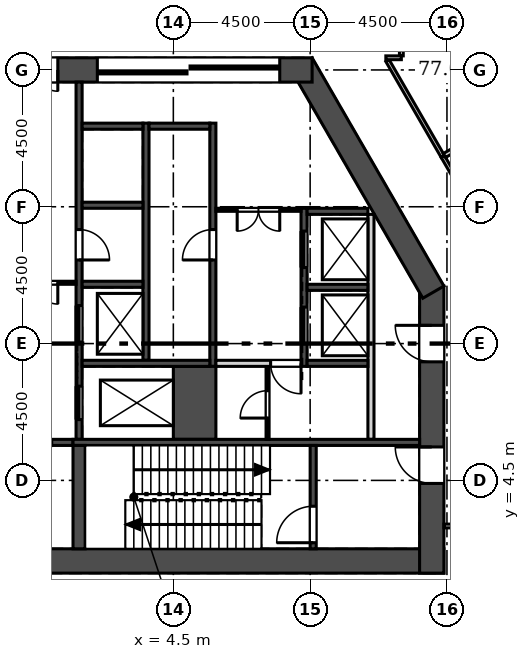
"""IFC4 building model, lengths in metres.
Left out: names, types, materials, properties, quantities, classifications, styles, units other than length and angle.
Written with IfcOpenShell. Run it as: python <this file> out.ifc"""

import sys

from ifc_helpers import new_model, si_unit, direction, frame, frame_2d, origin, place, context, subcontext, project, spatial, rectangle, extrude, element, fill, save


model = new_model("IFC4")
c1 = context("Model", 3, precision=1e-05, world=origin(), true_north=direction((0.0, 1.0)))
c2 = subcontext(c1, "Body", "Model", "MODEL_VIEW")
j1 = project(units=[si_unit("LENGTHUNIT", "METRE"), si_unit("PLANEANGLEUNIT", "RADIAN")], contexts=[c1])
p1 = place(None, origin())
s1 = spatial("IfcSite", under=j1, at=p1, CompositionType="ELEMENT")
p2 = place(p1, origin())
s2 = spatial("IfcBuilding", under=s1, at=p2, CompositionType="ELEMENT")
p3 = place(p2, frame((0.0, 0.0, 339.3)))
s3 = spatial("IfcBuildingStorey", under=s2, at=p3, CompositionType="ELEMENT", Elevation=339.3)
p4 = place(p3, frame((-13.4, 1.85, 0.0), z_axis=(0.0, 0.0, 1.0), x_axis=(1.0, 0.0, 0.0)))
e1 = element("IfcWall", 1, at=p4, inside=s3, PredefinedType="SHEAR", context=c2, shape_type="SweptSolid", body=[
    extrude(rectangle(XDim=26.8, YDim=0.8, at=frame_2d((13.4, 0.0))), origin(), (0.0, 0.0, 1.0), 5.4),
])
p5 = place(p3, frame((13.0, 1.45, 0.0), z_axis=(0.0, 0.0, 1.0), x_axis=(0.0, 1.0, 0.0)))
e2 = element("IfcWall", 2, at=p5, inside=s3, PredefinedType="SHEAR", context=c2, shape_type="SweptSolid", body=[
    extrude(rectangle(XDim=9.442, YDim=0.8, at=frame_2d((4.721, 0.0))), origin(), (0.0, 0.0, 1.0), 5.4),
])
p6 = place(p5, frame((2.95, 0.0, 0.0)))
e3 = element("IfcOpeningElement", 3, at=p6, cuts=e2, PredefinedType="OPENING", context=c2, shape_type="SweptSolid", body=[
    extrude(rectangle(XDim=1.2, YDim=2.1, at=frame_2d((0.6, 1.05))), frame((0.0, 0.41, 0.0), z_axis=(0.0, -1.0, 0.0), x_axis=(1.0, 0.0, 0.0)), (0.0, 0.0, 1.0), 0.82),
])
p7 = place(p5, frame((6.95, 0.0, 0.0)))
e4 = element("IfcOpeningElement", 4, at=p7, cuts=e2, PredefinedType="OPENING", context=c2, shape_type="SweptSolid", body=[
    extrude(rectangle(XDim=1.2, YDim=2.1, at=frame_2d((0.6, 1.05))), frame((0.0, 0.41, 0.0), z_axis=(0.0, -1.0, 0.0), x_axis=(1.0, 0.0, 0.0)), (0.0, 0.0, 1.0), 0.82),
])
p8 = place(p3, frame((13.054, 10.692, 0.0), z_axis=(0.0, 0.0, 1.0), x_axis=(-0.500015780397, 0.866016292776, 0.0)))
e5 = element("IfcWall", 5, at=p8, inside=s3, PredefinedType="SHEAR", context=c2, shape_type="SweptSolid", body=[
    extrude(rectangle(XDim=8.67, YDim=0.8, at=frame_2d((4.335, 0.0))), origin(), (0.0, 0.0, 1.0), 5.4),
])
p9 = place(p3, frame((9.065, 18.0, 0.0), z_axis=(0.0, 0.0, 1.0), x_axis=(-1.0, 0.0, 0.0)))
e6 = element("IfcWall", 6, at=p9, inside=s3, PredefinedType="SHEAR", context=c2, shape_type="SweptSolid", body=[
    extrude(rectangle(XDim=18.13, YDim=0.8, at=frame_2d((9.065, 0.0))), origin(), (0.0, 0.0, 1.0), 5.4),
])
p10 = place(p9, frame((8.365, 0.0, 0.0)))
e7 = element("IfcOpeningElement", 7, at=p10, cuts=e6, PredefinedType="OPENING", context=c2, shape_type="SweptSolid", body=[
    extrude(rectangle(XDim=1.4, YDim=2.1, at=frame_2d((0.7, 1.05))), frame((0.0, 0.41, 0.0), z_axis=(0.0, -1.0, 0.0), x_axis=(1.0, 0.0, 0.0)), (0.0, 0.0, 1.0), 0.82),
])
p11 = place(p9, frame((11.065, 0.0, 0.0)))
e8 = element("IfcOpeningElement", 8, at=p11, cuts=e6, PredefinedType="OPENING", context=c2, shape_type="SweptSolid", body=[
    extrude(rectangle(XDim=6.0, YDim=2.4, at=frame_2d((3.0, 1.2))), frame((0.0, 0.41, 0.0), z_axis=(0.0, -1.0, 0.0), x_axis=(1.0, 0.0, 0.0)), (0.0, 0.0, 1.0), 0.82),
])
p12 = place(p9, frame((1.065, 0.0, 0.0)))
e9 = element("IfcOpeningElement", 9, at=p12, cuts=e6, PredefinedType="OPENING", context=c2, shape_type="SweptSolid", body=[
    extrude(rectangle(XDim=6.0, YDim=2.4, at=frame_2d((3.0, 1.2))), frame((0.0, 0.41, 0.0), z_axis=(0.0, -1.0, 0.0), x_axis=(1.0, 0.0, 0.0)), (0.0, 0.0, 1.0), 0.82),
])
p13 = place(p3, frame((11.0, 5.85, 0.0), z_axis=(0.0, 0.0, 1.0), x_axis=(0.0, 1.0, 0.0)))
e10 = element("IfcWall", 10, at=p13, inside=s3, PredefinedType="SOLIDWALL", context=c2, shape_type="SweptSolid", body=[
    extrude(rectangle(XDim=7.4, YDim=0.2, at=frame_2d((3.7, 0.0))), origin(), (0.0, 0.0, 1.0), 4.6),
])
p14 = place(p3, frame((8.8, 8.25, -0.4), z_axis=(0.0, 0.0, 1.0), x_axis=(0.0, 1.0, 0.0)))
e11 = element("IfcWall", 11, at=p14, inside=s3, PredefinedType="SOLIDWALL", context=c2, shape_type="SweptSolid", body=[
    extrude(rectangle(XDim=5.2, YDim=0.2, at=frame_2d((2.6, 0.0))), origin(), (0.0, 0.0, 1.0), 5.0),
])
p15 = place(p14, frame((0.75, 0.0, 0.4)))
e12 = element("IfcOpeningElement", 12, at=p15, cuts=e11, PredefinedType="OPENING", context=c2, shape_type="SweptSolid", body=[
    extrude(rectangle(XDim=1.2, YDim=2.1, at=frame_2d((0.6, 1.05))), frame((0.0, 0.11, 0.0), z_axis=(0.0, -1.0, 0.0), x_axis=(1.0, 0.0, 0.0)), (0.0, 0.0, 1.0), 0.22),
])
p16 = place(p14, frame((3.25, 0.0, 0.4)))
e13 = element("IfcOpeningElement", 13, at=p16, cuts=e11, PredefinedType="OPENING", context=c2, shape_type="SweptSolid", body=[
    extrude(rectangle(XDim=1.2, YDim=2.1, at=frame_2d((0.6, 1.05))), frame((0.0, 0.11, 0.0), z_axis=(0.0, -1.0, 0.0), x_axis=(1.0, 0.0, 0.0)), (0.0, 0.0, 1.0), 0.22),
])
p17 = place(p3, frame((5.8, 8.25, -0.4), z_axis=(0.0, 0.0, 1.0), x_axis=(0.0, 1.0, 0.0)))
e14 = element("IfcWall", 14, at=p17, inside=s3, PredefinedType="SOLIDWALL", context=c2, shape_type="SweptSolid", body=[
    extrude(rectangle(XDim=8.0, YDim=0.2, at=frame_2d((4.0, 0.0))), origin(), (0.0, 0.0, 1.0), 5.0),
])
p18 = place(p17, frame((3.5, 0.0, 0.4)))
e15 = element("IfcOpeningElement", 15, at=p18, cuts=e14, PredefinedType="OPENING", context=c2, shape_type="SweptSolid", body=[
    extrude(rectangle(XDim=1.0, YDim=2.1, at=frame_2d((0.5, 1.05))), frame((0.0, 0.11, 0.0), z_axis=(0.0, -1.0, 0.0), x_axis=(1.0, 0.0, 0.0)), (0.0, 0.0, 1.0), 0.22),
])
p19 = place(p3, frame((3.6, 8.45, -0.4), z_axis=(0.0, 0.0, 1.0), x_axis=(0.0, 1.0, 0.0)))
e16 = element("IfcWall", 16, at=p19, inside=s3, PredefinedType="SOLIDWALL", context=c2, shape_type="SweptSolid", body=[
    extrude(rectangle(XDim=7.8, YDim=0.2, at=frame_2d((3.9, 0.0))), origin(), (0.0, 0.0, 1.0), 5.0),
])
p20 = place(p3, frame((1.4, 5.85, -0.4), z_axis=(0.0, 0.0, 1.0), x_axis=(0.0, 1.0, 0.0)))
e17 = element("IfcWall", 17, at=p20, inside=s3, PredefinedType="SOLIDWALL", context=c2, shape_type="SweptSolid", body=[
    extrude(rectangle(XDim=11.75, YDim=0.2, at=frame_2d((5.875, 0.0))), origin(), (0.0, 0.0, 1.0), 5.0),
])
p21 = place(p20, frame((3.2, 0.0, 0.4)))
e18 = element("IfcOpeningElement", 18, at=p21, cuts=e17, PredefinedType="OPENING", context=c2, shape_type="SweptSolid", body=[
    extrude(rectangle(XDim=1.2, YDim=2.1, at=frame_2d((0.6, 1.05))), frame((0.0, 0.11, 0.0), z_axis=(0.0, -1.0, 0.0), x_axis=(1.0, 0.0, 0.0)), (0.0, 0.0, 1.0), 0.22),
])
p22 = place(p20, frame((0.65, 0.0, 0.4)))
e19 = element("IfcOpeningElement", 19, at=p22, cuts=e17, PredefinedType="OPENING", context=c2, shape_type="SweptSolid", body=[
    extrude(rectangle(XDim=1.1, YDim=2.1, at=frame_2d((0.55, 1.05))), frame((0.0, 0.11, 0.0), z_axis=(0.0, -1.0, 0.0), x_axis=(1.0, 0.0, 0.0)), (0.0, 0.0, 1.0), 0.22),
])
p23 = place(p20, frame((5.9, 0.0, 0.4)))
e20 = element("IfcOpeningElement", 20, at=p23, cuts=e17, PredefinedType="OPENING", context=c2, shape_type="SweptSolid", body=[
    extrude(rectangle(XDim=1.0, YDim=2.1, at=frame_2d((0.5, 1.05))), frame((0.0, 0.11, 0.0), z_axis=(0.0, -1.0, 0.0), x_axis=(1.0, 0.0, 0.0)), (0.0, 0.0, 1.0), 0.22),
])
p24 = place(p3, frame((5.2, 5.85, -0.4), z_axis=(0.0, 0.0, 1.0), x_axis=(0.0, 1.0, 0.0)))
e21 = element("IfcWall", 21, at=p24, inside=s3, PredefinedType="SOLIDWALL", context=c2, shape_type="SweptSolid", body=[
    extrude(rectangle(XDim=2.4, YDim=1.4, at=frame_2d((1.2, 0.0))), origin(), (0.0, 0.0, 1.0), 5.0),
])
p25 = place(p3, frame((8.9, 8.35, -0.4), z_axis=(0.0, 0.0, 1.0), x_axis=(1.0, 0.0, 0.0)))
e22 = element("IfcWall", 22, at=p25, inside=s3, PredefinedType="SOLIDWALL", context=c2, shape_type="SweptSolid", body=[
    extrude(rectangle(XDim=2.0, YDim=0.2, at=frame_2d((1.0, 0.0))), origin(), (0.0, 0.0, 1.0), 5.0),
])
p26 = place(p3, frame((1.5, 8.35, -0.4), z_axis=(0.0, 0.0, 1.0), x_axis=(1.0, 0.0, 0.0)))
e23 = element("IfcWall", 23, at=p26, inside=s3, PredefinedType="SOLIDWALL", context=c2, shape_type="SweptSolid", body=[
    extrude(rectangle(XDim=4.2, YDim=0.2, at=frame_2d((2.1, 0.0))), origin(), (0.0, 0.0, 1.0), 5.0),
])
p27 = place(p3, frame((-1.2, 5.75, -0.4), z_axis=(0.0, 0.0, 1.0), x_axis=(1.0, 0.0, 0.0)))
e24 = element("IfcWall", 24, at=p27, inside=s3, PredefinedType="SOLIDWALL", context=c2, shape_type="SweptSolid", body=[
    extrude(rectangle(XDim=2.4, YDim=0.2, at=frame_2d((1.2, 0.0))), origin(), (0.0, 0.0, 1.0), 5.0),
])
p28 = place(p27, frame((0.7, 0.0, 0.4)))
e25 = element("IfcOpeningElement", 25, at=p28, cuts=e24, PredefinedType="OPENING", context=c2, shape_type="SweptSolid", body=[
    extrude(rectangle(XDim=1.0, YDim=2.1, at=frame_2d((0.5, 1.05))), frame((0.0, 0.11, 0.0), z_axis=(0.0, -1.0, 0.0), x_axis=(1.0, 0.0, 0.0)), (0.0, 0.0, 1.0), 0.22),
])
p29 = place(p3, frame((1.2, 5.75, -0.4), z_axis=(0.0, 0.0, 1.0), x_axis=(1.0, 0.0, 0.0)))
e26 = element("IfcWall", 26, at=p29, inside=s3, PredefinedType="SOLIDWALL", context=c2, shape_type="SweptSolid", body=[
    extrude(rectangle(XDim=11.4, YDim=0.2, at=frame_2d((5.7, 0.0))), origin(), (0.0, 0.0, 1.0), 5.0),
])
p30 = place(p3, frame((9.1, 2.25, -0.4), z_axis=(0.0, 0.0, 1.0), x_axis=(0.0, 1.0, 0.0)))
e27 = element("IfcWall", 27, at=p30, inside=s3, PredefinedType="SOLIDWALL", context=c2, shape_type="SweptSolid", body=[
    extrude(rectangle(XDim=3.4, YDim=0.2, at=frame_2d((1.7, 0.0))), origin(), (0.0, 0.0, 1.0), 5.0),
])
p31 = place(p30, frame((0.2, 0.0, 0.4)))
e28 = element("IfcOpeningElement", 28, at=p31, cuts=e27, PredefinedType="OPENING", context=c2, shape_type="SweptSolid", body=[
    extrude(rectangle(XDim=1.2, YDim=2.1, at=frame_2d((0.6, 1.05))), frame((0.0, 0.11, 0.0), z_axis=(0.0, -1.0, 0.0), x_axis=(1.0, 0.0, 0.0)), (0.0, 0.0, 1.0), 0.22),
])
p32 = place(p3, frame((1.4, 2.25, -0.4), z_axis=(0.0, 0.0, 1.0), x_axis=(0.0, 1.0, 0.0)))
e29 = element("IfcWall", 29, at=p32, inside=s3, PredefinedType="SOLIDWALL", context=c2, shape_type="SweptSolid", body=[
    extrude(rectangle(XDim=3.4, YDim=0.4, at=frame_2d((1.7, 0.0))), origin(), (0.0, 0.0, 1.0), 5.0),
])
for number, where, z_axis, x_axis in (
    (30, (8.9, 10.85, -0.4), (0.0, 0.0, 1.0), (1.0, 0.0, 0.0)),
    (31, (8.9, 13.35, -0.4), (0.0, 0.0, 1.0), (1.0, 0.0, 0.0)),
    (32, (3.7, 16.15, -0.4), (0.0, 0.0, 1.0), (1.0, 0.0, 0.0)),
    (33, (1.5, 10.95, -0.4), (0.0, 0.0, 1.0), (1.0, 0.0, 0.0)),
    (34, (1.5, 13.55, -0.4), (0.0, 0.0, 1.0), (1.0, 0.0, 0.0)),
    (35, (1.5, 16.15, -0.4), (0.0, 0.0, 1.0), (1.0, 0.0, 0.0)),
):
    element("IfcWall", number, at=place(p3, frame(where, z_axis=z_axis, x_axis=x_axis)), inside=s3, PredefinedType="SOLIDWALL", context=c2, shape_type="SweptSolid", body=[
        extrude(rectangle(XDim=2.0, YDim=0.2, at=frame_2d((1.0, 0.0))), origin(), (0.0, 0.0, 1.0), 5.0),
    ])
p33 = place(p3, frame((5.9, 13.4, 0.0), z_axis=(0.0, 0.0, 1.0), x_axis=(1.0, 0.0, 0.0)))
e36 = element("IfcWall", 36, at=p33, inside=s3, PredefinedType="PARTITIONING", context=c2, shape_type="SweptSolid", body=[
    extrude(rectangle(XDim=2.8, YDim=0.1, at=frame_2d((1.4, 0.0))), origin(), (0.0, 0.0, 1.0), 4.6),
])
p34 = place(p33, frame((0.7, 0.0, 0.0)))
e37 = element("IfcOpeningElement", 37, at=p34, cuts=e36, PredefinedType="OPENING", context=c2, shape_type="SweptSolid", body=[
    extrude(rectangle(XDim=1.4, YDim=2.1, at=frame_2d((0.7, 1.05))), frame((0.0, 0.06, 0.0), z_axis=(0.0, -1.0, 0.0), x_axis=(1.0, 0.0, 0.0)), (0.0, 0.0, 1.0), 0.12),
])
p35 = place(p3, frame((7.6, 5.85, 0.0), z_axis=(0.0, 0.0, 1.0), x_axis=(0.0, 1.0, 0.0)))
e38 = element("IfcWall", 38, at=p35, inside=s3, PredefinedType="PARTITIONING", context=c2, shape_type="SweptSolid", body=[
    extrude(rectangle(XDim=2.4, YDim=0.1, at=frame_2d((1.2, 0.0))), origin(), (0.0, 0.0, 1.0), 4.6),
])
p36 = place(p35, frame((0.7, 0.0, 0.0)))
e39 = element("IfcOpeningElement", 39, at=p36, cuts=e38, PredefinedType="OPENING", context=c2, shape_type="SweptSolid", body=[
    extrude(rectangle(XDim=0.9, YDim=2.1, at=frame_2d((0.45, 1.05))), frame((0.0, 0.06, 0.0), z_axis=(0.0, -1.0, 0.0), x_axis=(1.0, 0.0, 0.0)), (0.0, 0.0, 1.0), 0.12),
])
p37 = place(p3, frame((5.9, 8.35, 0.0), z_axis=(0.0, 0.0, 1.0), x_axis=(1.0, 0.0, 0.0)))
e40 = element("IfcWall", 40, at=p37, inside=s3, PredefinedType="SOLIDWALL", context=c2, shape_type="SweptSolid", body=[
    extrude(rectangle(XDim=2.8, YDim=0.2, at=frame_2d((1.4, 0.0))), origin(), (0.0, 0.0, 1.0), 4.6),
])
p38 = place(p37, frame((1.8, 0.0, 0.0)))
e41 = element("IfcOpeningElement", 41, at=p38, cuts=e40, PredefinedType="OPENING", context=c2, shape_type="SweptSolid", body=[
    extrude(rectangle(XDim=1.0, YDim=2.1, at=frame_2d((0.5, 1.05))), frame((0.0, 0.11, 0.0), z_axis=(0.0, -1.0, 0.0), x_axis=(1.0, 0.0, 0.0)), (0.0, 0.0, 1.0), 0.22),
])
p39 = place(p3, frame((-1.3, 11.0, 0.0), z_axis=(0.0, 0.0, 1.0), x_axis=(1.0, 0.0, 0.0)))
e42 = element("IfcWall", 42, at=p39, inside=s3, PredefinedType="PARTITIONING", context=c2, shape_type="SweptSolid", body=[
    extrude(rectangle(XDim=2.6, YDim=0.1, at=frame_2d((1.3, 0.0))), origin(), (0.0, 0.0, 1.0), 4.6),
])
p40 = place(p39, frame((0.6, 0.0, 0.0)))
e43 = element("IfcOpeningElement", 43, at=p40, cuts=e42, PredefinedType="OPENING", context=c2, shape_type="SweptSolid", body=[
    extrude(rectangle(XDim=1.4, YDim=2.1, at=frame_2d((0.7, 1.05))), frame((0.0, 0.06, 0.0), z_axis=(0.0, -1.0, 0.0), x_axis=(1.0, 0.0, 0.0)), (0.0, 0.0, 1.0), 0.12),
])
p41 = place(p3, frame((11.544, 18.306, 0.0), z_axis=(0.0, 0.0, 1.0), x_axis=(0.500007048974, -0.866021334019, 0.0)))
e44 = element("IfcWall", 44, at=p41, inside=s3, PredefinedType="PARTITIONING", context=c2, shape_type="SweptSolid", body=[
    extrude(rectangle(XDim=3.639, YDim=0.125, at=frame_2d((1.819, 0.0))), origin(), (0.0, 0.0, 1.0), 4.6),
])
p42 = place(p3, frame((15.438, 3.0, 0.0), z_axis=(0.0, 0.0, 1.0), x_axis=(-1.0, 0.0, 0.0)))
e45 = element("IfcWall", 45, at=p42, inside=s3, PredefinedType="PARTITIONING", context=c2, shape_type="SweptSolid", body=[
    extrude(rectangle(XDim=2.038, YDim=0.125, at=frame_2d((1.019, 0.0))), origin(), (0.0, 0.0, 1.0), 4.6),
])
p43 = place(p42, frame((0.519, 0.0, 0.0)))
e46 = element("IfcOpeningElement", 46, at=p43, cuts=e45, PredefinedType="OPENING", context=c2, shape_type="SweptSolid", body=[
    extrude(rectangle(XDim=1.0, YDim=2.1, at=frame_2d((0.5, 1.05))), frame((0.0, 0.073, 0.0), z_axis=(0.0, -1.0, 0.0), x_axis=(1.0, 0.0, 0.0)), (0.0, 0.0, 1.0), 0.145),
])
p44 = place(p3, frame((13.364, 15.155, 0.0), z_axis=(0.0, 0.0, 1.0), x_axis=(0.499974900732, -0.866039894369, 0.0)))
e47 = element("IfcWall", 47, at=p44, inside=s3, PredefinedType="PARTITIONING", context=c2, shape_type="SweptSolid", body=[
    extrude(rectangle(XDim=4.381, YDim=0.125, at=frame_2d((2.19, 0.0))), origin(), (0.0, 0.0, 1.0), 4.6),
])
p45 = place(p3, frame((12.0, 20.837, 0.0), z_axis=(0.0, 0.0, 1.0), x_axis=(0.0, -1.0, 0.0)))
e48 = element("IfcWall", 48, at=p45, inside=s3, PredefinedType="PARTITIONING", context=c2, shape_type="SweptSolid", body=[
    extrude(rectangle(XDim=2.375, YDim=0.125, at=frame_2d((1.187, 0.0))), origin(), (0.0, 0.0, 1.0), 4.6),
])
p46 = place(p3, frame((12.0, 18.4, 0.0), z_axis=(0.0, 0.0, 1.0), x_axis=(-1.0, 0.0, 0.0)))
e49 = element("IfcWall", 49, at=p46, inside=s3, PredefinedType="PARTITIONING", context=c2, shape_type="SweptSolid", body=[
    extrude(rectangle(XDim=0.51, YDim=0.125, at=frame_2d((0.255, 0.0))), origin(), (0.0, 0.0, 1.0), 4.6),
])
p47 = place(p3, frame((17.811, 17.722, 0.0), z_axis=(0.0, 0.0, 1.0), x_axis=(-0.86601005171, -0.50002658963, 0.0)))
e50 = element("IfcWall", 50, at=p47, inside=s3, PredefinedType="PARTITIONING", context=c2, shape_type="SweptSolid", body=[
    extrude(rectangle(XDim=5.073, YDim=0.15, at=frame_2d((2.536, 0.0))), origin(), (0.0, 0.0, 1.0), 4.6),
])
p48 = place(p15, origin())
e51 = element("IfcDoor", 51, at=p48, inside=s3, OperationType="SLIDING_TO_LEFT", PredefinedType="DOOR", context=c2, shape_type="SweptSolid", body=[
    extrude(rectangle(XDim=1.2, YDim=2.1, at=frame_2d((0.6, 1.05))), frame((0.0, 0.025, 0.0), z_axis=(0.0, -1.0, 0.0), x_axis=(1.0, 0.0, 0.0)), (0.0, 0.0, 1.0), 0.05),
])
fill(e12, e51)
p49 = place(p16, origin())
e52 = element("IfcDoor", 52, at=p49, inside=s3, OperationType="SLIDING_TO_LEFT", PredefinedType="DOOR", context=c2, shape_type="SweptSolid", body=[
    extrude(rectangle(XDim=1.2, YDim=2.1, at=frame_2d((0.6, 1.05))), frame((0.0, 0.025, 0.0), z_axis=(0.0, -1.0, 0.0), x_axis=(1.0, 0.0, 0.0)), (0.0, 0.0, 1.0), 0.05),
])
fill(e13, e52)
p50 = place(p21, origin())
e53 = element("IfcDoor", 53, at=p50, inside=s3, OperationType="SLIDING_TO_LEFT", PredefinedType="DOOR", context=c2, shape_type="SweptSolid", body=[
    extrude(rectangle(XDim=1.2, YDim=2.1, at=frame_2d((0.6, 1.05))), frame((0.0, 0.025, 0.0), z_axis=(0.0, -1.0, 0.0), x_axis=(1.0, 0.0, 0.0)), (0.0, 0.0, 1.0), 0.05),
])
fill(e18, e53)
p51 = place(p22, origin())
e54 = element("IfcDoor", 54, at=p51, inside=s3, OperationType="SLIDING_TO_RIGHT", PredefinedType="DOOR", context=c2, shape_type="SweptSolid", body=[
    extrude(rectangle(XDim=1.1, YDim=2.1, at=frame_2d((0.55, 1.05))), frame((0.0, 0.025, 0.0), z_axis=(0.0, -1.0, 0.0), x_axis=(1.0, 0.0, 0.0)), (0.0, 0.0, 1.0), 0.05),
])
fill(e19, e54)
p52 = place(p18, origin())
e55 = element("IfcDoor", 55, at=p52, inside=s3, OperationType="SINGLE_SWING_LEFT", PredefinedType="DOOR", context=c2, shape_type="SweptSolid", body=[
    extrude(rectangle(XDim=1.0, YDim=2.1, at=frame_2d((0.5, 1.05))), frame((0.0, 0.025, 0.0), z_axis=(0.0, -1.0, 0.0), x_axis=(1.0, 0.0, 0.0)), (0.0, 0.0, 1.0), 0.05),
])
fill(e15, e55)
p53 = place(p23, frame((1.0, 0.0, 0.0), z_axis=(0.0, 0.0, 1.0), x_axis=(-1.0, 0.0, 0.0)))
e56 = element("IfcDoor", 56, at=p53, inside=s3, OperationType="SINGLE_SWING_RIGHT", PredefinedType="DOOR", context=c2, shape_type="SweptSolid", body=[
    extrude(rectangle(XDim=1.0, YDim=2.1, at=frame_2d((0.5, 1.05))), frame((0.0, 0.025, 0.0), z_axis=(0.0, -1.0, 0.0), x_axis=(1.0, 0.0, 0.0)), (0.0, 0.0, 1.0), 0.05),
])
fill(e20, e56)
p54 = place(p34, frame((1.4, 0.0, 0.0), z_axis=(0.0, 0.0, 1.0), x_axis=(-1.0, 0.0, 0.0)))
e57 = element("IfcDoor", 57, at=p54, inside=s3, OperationType="DOUBLE_DOOR_SINGLE_SWING", PredefinedType="DOOR", context=c2, shape_type="SweptSolid", body=[
    extrude(rectangle(XDim=1.4, YDim=2.1, at=frame_2d((0.7, 1.05))), frame((0.0, 0.025, 0.0), z_axis=(0.0, -1.0, 0.0), x_axis=(1.0, 0.0, 0.0)), (0.0, 0.0, 1.0), 0.05),
])
fill(e37, e57)
p55 = place(p38, frame((1.0, 0.0, 0.0), z_axis=(0.0, 0.0, 1.0), x_axis=(-1.0, 0.0, 0.0)))
e58 = element("IfcDoor", 58, at=p55, inside=s3, OperationType="SINGLE_SWING_LEFT", PredefinedType="DOOR", context=c2, shape_type="SweptSolid", body=[
    extrude(rectangle(XDim=1.0, YDim=2.1, at=frame_2d((0.5, 1.05))), frame((0.0, 0.025, 0.0), z_axis=(0.0, -1.0, 0.0), x_axis=(1.0, 0.0, 0.0)), (0.0, 0.0, 1.0), 0.05),
])
fill(e41, e58)
p56 = place(p36, origin())
e59 = element("IfcDoor", 59, at=p56, inside=s3, OperationType="SINGLE_SWING_LEFT", PredefinedType="DOOR", context=c2, shape_type="SweptSolid", body=[
    extrude(rectangle(XDim=0.9, YDim=2.1, at=frame_2d((0.45, 1.05))), frame((0.0, 0.025, 0.0), z_axis=(0.0, -1.0, 0.0), x_axis=(1.0, 0.0, 0.0)), (0.0, 0.0, 1.0), 0.05),
])
fill(e39, e59)
p57 = place(p6, origin())
e60 = element("IfcDoor", 60, at=p57, inside=s3, OperationType="SINGLE_SWING_RIGHT", PredefinedType="DOOR", context=c2, shape_type="SweptSolid", body=[
    extrude(rectangle(XDim=1.2, YDim=2.1, at=frame_2d((0.6, 1.05))), frame((0.0, 0.025, 0.0), z_axis=(0.0, -1.0, 0.0), x_axis=(1.0, 0.0, 0.0)), (0.0, 0.0, 1.0), 0.05),
])
fill(e3, e60)
p58 = place(p31, origin())
e61 = element("IfcDoor", 61, at=p58, inside=s3, OperationType="SINGLE_SWING_LEFT", PredefinedType="DOOR", context=c2, shape_type="SweptSolid", body=[
    extrude(rectangle(XDim=1.2, YDim=2.1, at=frame_2d((0.6, 1.05))), frame((0.0, 0.025, 0.0), z_axis=(0.0, -1.0, 0.0), x_axis=(1.0, 0.0, 0.0)), (0.0, 0.0, 1.0), 0.05),
])
fill(e28, e61)
p59 = place(p7, origin())
e62 = element("IfcDoor", 62, at=p59, inside=s3, OperationType="SINGLE_SWING_RIGHT", PredefinedType="DOOR", context=c2, shape_type="SweptSolid", body=[
    extrude(rectangle(XDim=1.2, YDim=2.1, at=frame_2d((0.6, 1.05))), frame((0.0, 0.025, 0.0), z_axis=(0.0, -1.0, 0.0), x_axis=(1.0, 0.0, 0.0)), (0.0, 0.0, 1.0), 0.05),
])
fill(e4, e62)
p60 = place(p40, frame((1.4, 0.0, 0.0), z_axis=(0.0, 0.0, 1.0), x_axis=(-1.0, 0.0, 0.0)))
e63 = element("IfcDoor", 63, at=p60, inside=s3, OperationType="DOUBLE_DOOR_SINGLE_SWING", PredefinedType="DOOR", context=c2, shape_type="SweptSolid", body=[
    extrude(rectangle(XDim=1.4, YDim=2.1, at=frame_2d((0.7, 1.05))), frame((0.0, 0.025, 0.0), z_axis=(0.0, -1.0, 0.0), x_axis=(1.0, 0.0, 0.0)), (0.0, 0.0, 1.0), 0.05),
])
fill(e43, e63)
p61 = place(p10, origin())
e64 = element("IfcDoor", 64, at=p61, inside=s3, OperationType="DOUBLE_DOOR_SINGLE_SWING", PredefinedType="DOOR", context=c2, shape_type="SweptSolid", body=[
    extrude(rectangle(XDim=1.4, YDim=2.1, at=frame_2d((0.7, 1.05))), frame((0.0, 0.025, 0.0), z_axis=(0.0, -1.0, 0.0), x_axis=(1.0, 0.0, 0.0)), (0.0, 0.0, 1.0), 0.05),
])
fill(e7, e64)
p62 = place(p12, origin())
e65 = element("IfcDoor", 65, at=p62, inside=s3, OperationType="DOUBLE_DOOR_SLIDING", PredefinedType="DOOR", context=c2, shape_type="SweptSolid", body=[
    extrude(rectangle(XDim=6.0, YDim=2.4, at=frame_2d((3.0, 1.2))), frame((0.0, 0.025, 0.0), z_axis=(0.0, -1.0, 0.0), x_axis=(1.0, 0.0, 0.0)), (0.0, 0.0, 1.0), 0.05),
])
fill(e9, e65)
save(model, sys.argv[1])
